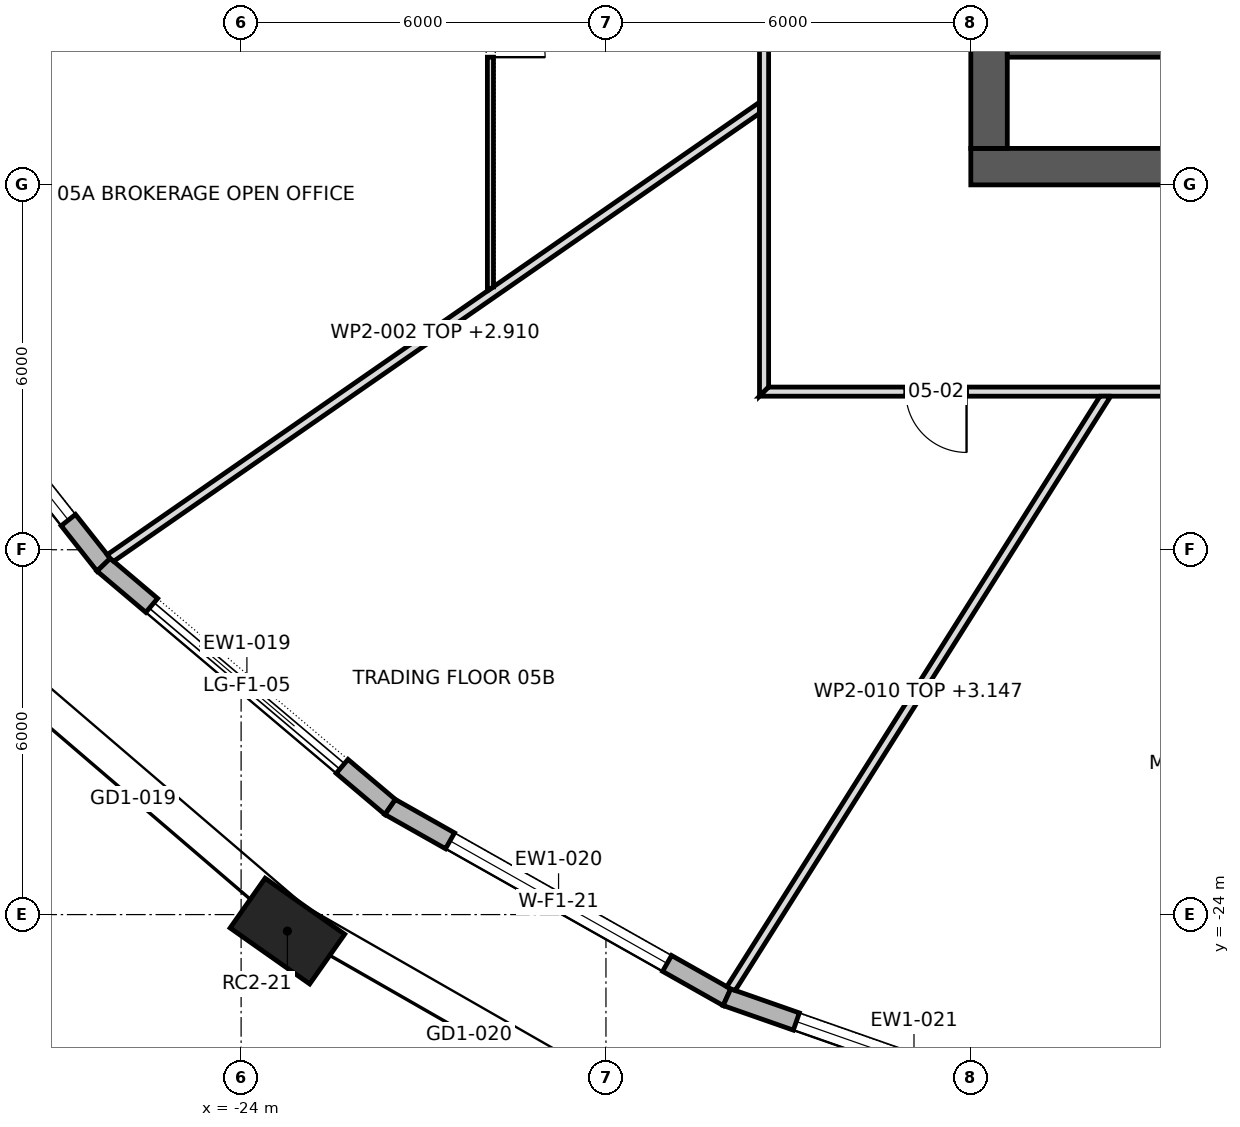
"""IFC4 building model, lengths in metres.
Left out: names, types, materials, properties, quantities, classifications, styles, units other than length and angle.
Written with IfcOpenShell. Run it as: python <this file> out.ifc"""

import sys

from ifc_helpers import new_model, si_unit, direction, frame, frame_2d, origin, origin_2d, place, context, subcontext, project, spatial, polyline, rectangle, outline, extrude, element, fill, save


model = new_model("IFC4")
c1 = context("Model", 3, precision=1e-05, world=origin(), true_north=direction((0.0, 1.0)))
c2 = subcontext(c1, "Body", "Model", "MODEL_VIEW")
j1 = project(units=[si_unit("LENGTHUNIT", "METRE"), si_unit("PLANEANGLEUNIT", "RADIAN")], contexts=[c1])
p1 = place(None, origin())
s1 = spatial("IfcSite", under=j1, at=p1, CompositionType="ELEMENT")
p2 = place(p1, origin())
s2 = spatial("IfcBuilding", under=s1, at=p2, CompositionType="ELEMENT")
p3 = place(p2, frame((0.0, 0.0, 73.9)))
s3 = spatial("IfcBuildingStorey", under=s2, at=p3, CompositionType="ELEMENT", Elevation=73.9)
p4 = place(p3, frame((-23.239, -24.271, 0.0), z_axis=(0.0, 0.0, 1.0), x_axis=(0.817908788019, -0.57534790734, 0.0)))
e1 = element("IfcColumn", 1, at=p4, inside=s3, PredefinedType="COLUMN", context=c2, shape_type="SweptSolid", body=[
    extrude(rectangle(XDim=1.6, YDim=1.0, at=origin_2d()), origin(), (0.0, 0.0, 1.0), 4.2),
])
p5 = place(p3, frame((-12.0, -11.7, 0.0), z_axis=(0.0, 0.0, 1.0), x_axis=(1.0, 0.0, 0.0)))
e2 = element("IfcWall", 2, at=p5, inside=s3, PredefinedType="SHEAR", context=c2, shape_type="SweptSolid", body=[
    extrude(rectangle(XDim=24.0, YDim=0.6, at=frame_2d((12.0, 0.0))), origin(), (0.0, 0.0, 1.0), 4.2),
])
p6 = place(p5, frame((9.975, 0.0, 0.0)))
e3 = element("IfcOpeningElement", 3, at=p6, cuts=e2, PredefinedType="OPENING", context=c2, shape_type="SweptSolid", body=[
    extrude(rectangle(XDim=0.9, YDim=2.1, at=frame_2d((0.45, 1.05))), frame((0.0, 0.312, 0.0), z_axis=(0.0, -1.0, 0.0), x_axis=(1.0, 0.0, 0.0)), (0.0, 0.0, 1.0), 0.624),
])
p7 = place(p5, frame((4.6, 0.0, 0.0)))
e4 = element("IfcOpeningElement", 4, at=p7, cuts=e2, PredefinedType="OPENING", context=c2, shape_type="SweptSolid", body=[
    extrude(rectangle(XDim=0.8, YDim=2.1, at=frame_2d((0.4, 1.05))), frame((0.0, 0.312, 0.0), z_axis=(0.0, -1.0, 0.0), x_axis=(1.0, 0.0, 0.0)), (0.0, 0.0, 1.0), 0.624),
])
p8 = place(p5, frame((7.0, 0.0, 0.0)))
e5 = element("IfcOpeningElement", 5, at=p8, cuts=e2, PredefinedType="OPENING", context=c2, shape_type="SweptSolid", body=[
    extrude(rectangle(XDim=0.8, YDim=2.1, at=frame_2d((0.4, 1.05))), frame((0.0, 0.312, 0.0), z_axis=(0.0, -1.0, 0.0), x_axis=(1.0, 0.0, 0.0)), (0.0, 0.0, 1.0), 0.624),
])
p9 = place(p5, frame((15.85, 0.0, 0.0)))
e6 = element("IfcOpeningElement", 6, at=p9, cuts=e2, PredefinedType="OPENING", context=c2, shape_type="SweptSolid", body=[
    extrude(rectangle(XDim=0.8, YDim=2.1, at=frame_2d((0.4, 1.05))), frame((0.0, 0.312, 0.0), z_axis=(0.0, -1.0, 0.0), x_axis=(1.0, 0.0, 0.0)), (0.0, 0.0, 1.0), 0.624),
])
p10 = place(p3, frame((-11.7, -11.4, 0.0), z_axis=(0.0, 0.0, 1.0), x_axis=(0.0, 1.0, 0.0)))
e7 = element("IfcWall", 7, at=p10, inside=s3, PredefinedType="SHEAR", context=c2, shape_type="SweptSolid", body=[
    extrude(rectangle(XDim=22.8, YDim=0.6, at=frame_2d((11.4, 0.0))), origin(), (0.0, 0.0, 1.0), 4.2),
])
p11 = place(p10, frame((10.2, 0.0, 0.0)))
e8 = element("IfcOpeningElement", 8, at=p11, cuts=e7, PredefinedType="OPENING", context=c2, shape_type="SweptSolid", body=[
    extrude(rectangle(XDim=2.4, YDim=2.1, at=frame_2d((1.2, 1.05))), frame((0.0, 0.312, 0.0), z_axis=(0.0, -1.0, 0.0), x_axis=(1.0, 0.0, 0.0)), (0.0, 0.0, 1.0), 0.624),
])
p12 = place(p10, frame((18.925, 0.0, 0.0)))
e9 = element("IfcOpeningElement", 9, at=p12, cuts=e7, PredefinedType="OPENING", context=c2, shape_type="SweptSolid", body=[
    extrude(rectangle(XDim=1.2, YDim=2.1, at=frame_2d((0.6, 1.05))), frame((0.0, 0.312, 0.0), z_axis=(0.0, -1.0, 0.0), x_axis=(1.0, 0.0, 0.0)), (0.0, 0.0, 1.0), 0.624),
])
p13 = place(p10, frame((2.675, 0.0, 0.0)))
e10 = element("IfcOpeningElement", 10, at=p13, cuts=e7, PredefinedType="OPENING", context=c2, shape_type="SweptSolid", body=[
    extrude(rectangle(XDim=1.2, YDim=2.1, at=frame_2d((0.6, 1.05))), frame((0.0, 0.312, 0.0), z_axis=(0.0, -1.0, 0.0), x_axis=(1.0, 0.0, 0.0)), (0.0, 0.0, 1.0), 0.624),
])
p14 = place(p3, frame((-29.964, -13.562, 0.0), z_axis=(0.0, 0.0, 1.0), x_axis=(0.620093447965, -0.784527957303, 0.0)))
e11 = element("IfcWall", 11, at=p14, inside=s3, PredefinedType="STANDARD", context=c2, shape_type="SweptSolid", body=[
    extrude(outline(polyline([(-0.016, -0.15), (5.988, -0.15), (5.958, 0.15), (0.016, 0.15), (-0.016, -0.15)])), origin(), (0.0, 0.0, 1.0), 3.9),
])
p15 = place(p14, frame((0.937, 0.0, 0.6)))
e12 = element("IfcOpeningElement", 12, at=p15, cuts=e11, PredefinedType="OPENING", context=c2, shape_type="SweptSolid", body=[
    extrude(rectangle(XDim=4.1, YDim=2.85, at=frame_2d((2.05, 1.425))), frame((0.0, 0.162, 0.0), z_axis=(0.0, -1.0, 0.0), x_axis=(1.0, 0.0, 0.0)), (0.0, 0.0, 1.0), 0.324),
])
p16 = place(p3, frame((-26.26, -18.248, 0.0), z_axis=(0.0, 0.0, 1.0), x_axis=(0.763693886759, -0.645578536916, 0.0)))
e13 = element("IfcWall", 13, at=p16, inside=s3, PredefinedType="STANDARD", context=c2, shape_type="SweptSolid", body=[
    extrude(outline(polyline([(-0.015, -0.15), (6.184, -0.15), (6.156, 0.15), (0.015, 0.15), (-0.015, -0.15)])), origin(), (0.0, 0.0, 1.0), 3.9),
])
p17 = place(p16, frame((1.035, 0.0, 0.0)))
e14 = element("IfcOpeningElement", 14, at=p17, cuts=e13, PredefinedType="OPENING", context=c2, shape_type="SweptSolid", body=[
    extrude(rectangle(XDim=4.1, YDim=3.45, at=frame_2d((2.05, 1.725))), frame((0.0, 0.162, 0.0), z_axis=(0.0, -1.0, 0.0), x_axis=(1.0, 0.0, 0.0)), (0.0, 0.0, 1.0), 0.324),
])
p18 = place(p3, frame((-21.549, -22.231, 0.0), z_axis=(0.0, 0.0, 1.0), x_axis=(0.870710061474, -0.491796694629, 0.0)))
e15 = element("IfcWall", 15, at=p18, inside=s3, PredefinedType="STANDARD", context=c2, shape_type="SweptSolid", body=[
    extrude(outline(polyline([(-0.014, -0.15), (6.374, -0.15), (6.347, 0.15), (0.014, 0.15), (-0.014, -0.15)])), origin(), (0.0, 0.0, 1.0), 3.9),
])
p19 = place(p18, frame((1.13, 0.0, 0.6)))
e16 = element("IfcOpeningElement", 16, at=p19, cuts=e15, PredefinedType="OPENING", context=c2, shape_type="SweptSolid", body=[
    extrude(rectangle(XDim=4.1, YDim=2.85, at=frame_2d((2.05, 1.425))), frame((0.0, 0.162, 0.0), z_axis=(0.0, -1.0, 0.0), x_axis=(1.0, 0.0, 0.0)), (0.0, 0.0, 1.0), 0.324),
])
p20 = place(p3, frame((-16.01, -25.359, 0.0), z_axis=(0.0, 0.0, 1.0), x_axis=(0.943815136299, -0.330473884736, 0.0)))
e17 = element("IfcWall", 17, at=p20, inside=s3, PredefinedType="STANDARD", context=c2, shape_type="SweptSolid", body=[
    extrude(outline(polyline([(-0.013, -0.15), (6.531, -0.15), (6.505, 0.15), (0.013, 0.15), (-0.013, -0.15)])), origin(), (0.0, 0.0, 1.0), 3.9),
])
p21 = place(p20, frame((1.209, 0.0, 0.6)))
e18 = element("IfcOpeningElement", 18, at=p21, cuts=e17, PredefinedType="OPENING", context=c2, shape_type="SweptSolid", body=[
    extrude(rectangle(XDim=4.1, YDim=2.85, at=frame_2d((2.05, 1.425))), frame((0.0, 0.162, 0.0), z_axis=(0.0, -1.0, 0.0), x_axis=(1.0, 0.0, 0.0)), (0.0, 0.0, 1.0), 0.324),
])
p22 = place(p3, frame((-11.4, -9.825, 0.0), z_axis=(0.0, 0.0, 1.0), x_axis=(1.0, 0.0, 0.0)))
e19 = element("IfcWall", 19, at=p22, inside=s3, PredefinedType="SHEAR", context=c2, shape_type="SweptSolid", body=[
    extrude(rectangle(XDim=8.0, YDim=0.15, at=frame_2d((4.0, 0.0))), origin(), (0.0, 0.0, 1.0), 3.9),
])
p23 = place(p3, frame((-26.158, -18.142, 0.0), z_axis=(0.0, 0.0, 1.0), x_axis=(0.821670699987, 0.569962508226, 0.0)))
e20 = element("IfcWall", 20, at=p23, inside=s3, PredefinedType="PARTITIONING", context=c2, shape_type="SweptSolid", body=[
    extrude(outline(polyline([(0.024, -0.075), (1.87, -0.075), (3.717, -0.075), (5.563, -0.075), (7.41, -0.075), (9.257, -0.075), (11.103, -0.075), (12.95, -0.075), (13.003, 0.002), (13.003, 0.002), (13.053, 0.074), (13.053, 0.075), (11.279, 0.075), (9.504, 0.075), (7.729, 0.075), (7.728, 0.073), (7.726, 0.075), (5.794, 0.075), (3.863, 0.075), (1.931, 0.075), (0.0, 0.075), (0.0, 0.073), (0.005, -0.004), (0.024, -0.075)])), origin(), (0.0, 0.0, 1.0), 2.91),
])
p24 = place(p3, frame((-19.9, -13.744, 0.0), z_axis=(0.0, 0.0, 1.0), x_axis=(0.0, 1.0, 0.0)))
e21 = element("IfcWall", 21, at=p24, inside=s3, PredefinedType="PARTITIONING", context=c2, shape_type="SweptSolid", body=[
    extrude(outline(polyline([(0.069, -0.05), (1.976, -0.05), (3.882, -0.05), (5.788, -0.05), (7.695, -0.05), (9.601, -0.05), (11.508, -0.05), (13.414, -0.05), (15.321, -0.05), (15.329, 0.049), (15.329, 0.05), (13.644, 0.05), (11.958, 0.05), (10.273, 0.05), (8.588, 0.05), (8.58, 0.048), (8.58, 0.05), (6.864, 0.05), (5.148, 0.05), (3.432, 0.05), (1.716, 0.05), (0.0, 0.05), (0.0, 0.05), (0.069, -0.05)])), origin(), (0.0, 0.0, 1.0), 3.9),
])
p25 = place(p24, frame((3.844, 0.0, 0.0)))
e22 = element("IfcOpeningElement", 22, at=p25, cuts=e21, PredefinedType="OPENING", context=c2, shape_type="SweptSolid", body=[
    extrude(rectangle(XDim=0.9, YDim=2.1, at=frame_2d((0.45, 1.05))), frame((0.0, 0.062, 0.0), z_axis=(0.0, -1.0, 0.0), x_axis=(1.0, 0.0, 0.0)), (0.0, 0.0, 1.0), 0.124),
])
p26 = place(p24, frame((13.294, 0.0, 0.0)))
e23 = element("IfcOpeningElement", 23, at=p26, cuts=e21, PredefinedType="OPENING", context=c2, shape_type="SweptSolid", body=[
    extrude(rectangle(XDim=0.9, YDim=2.1, at=frame_2d((0.45, 1.05))), frame((0.0, 0.062, 0.0), z_axis=(0.0, -1.0, 0.0), x_axis=(1.0, 0.0, 0.0)), (0.0, 0.0, 1.0), 0.124),
])
p27 = place(p3, frame((-15.4, -15.475, 0.0), z_axis=(0.0, 0.0, 1.0), x_axis=(0.0, 1.0, 0.0)))
e24 = element("IfcWall", 24, at=p27, inside=s3, PredefinedType="PARTITIONING", context=c2, shape_type="SweptSolid", body=[
    extrude(outline(polyline([(0.15, -0.075), (2.066, -0.075), (3.981, -0.075), (5.897, -0.075), (7.812, -0.075), (9.728, -0.075), (11.644, -0.075), (13.56, -0.075), (15.475, -0.075), (17.391, -0.075), (19.306, -0.075), (21.222, -0.075), (23.138, -0.075), (25.053, -0.075), (26.969, -0.075), (28.885, -0.075), (30.8, -0.075), (30.95, 0.075), (29.016, 0.075), (27.081, 0.075), (25.147, 0.075), (23.212, 0.075), (21.278, 0.075), (19.344, 0.075), (17.409, 0.075), (15.475, 0.075), (13.541, 0.075), (11.606, 0.075), (9.672, 0.075), (7.738, 0.075), (5.803, 0.075), (3.869, 0.075), (1.935, 0.075), (0.0, 0.075), (0.15, -0.075)])), origin(), (0.0, 0.0, 1.0), 3.9),
])
p28 = place(p27, frame((10.275, 0.0, 0.0)))
e25 = element("IfcOpeningElement", 25, at=p28, cuts=e24, PredefinedType="OPENING", context=c2, shape_type="SweptSolid", body=[
    extrude(rectangle(XDim=1.0, YDim=2.1, at=frame_2d((0.5, 1.05))), frame((0.0, 0.087, 0.0), z_axis=(0.0, -1.0, 0.0), x_axis=(1.0, 0.0, 0.0)), (0.0, 0.0, 1.0), 0.174),
])
p29 = place(p27, frame((22.915, 0.0, 0.0)))
e26 = element("IfcOpeningElement", 26, at=p29, cuts=e24, PredefinedType="OPENING", context=c2, shape_type="SweptSolid", body=[
    extrude(rectangle(XDim=1.8, YDim=2.1, at=frame_2d((0.9, 1.05))), frame((0.0, 0.087, 0.0), z_axis=(0.0, -1.0, 0.0), x_axis=(1.0, 0.0, 0.0)), (0.0, 0.0, 1.0), 0.174),
])
p30 = place(p3, frame((-15.475, -15.4, 0.0), z_axis=(0.0, 0.0, 1.0), x_axis=(1.0, 0.0, 0.0)))
e27 = element("IfcWall", 27, at=p30, inside=s3, PredefinedType="PARTITIONING", context=c2, shape_type="SweptSolid", body=[
    extrude(outline(polyline([(0.0, -0.075), (1.935, -0.075), (3.869, -0.075), (5.803, -0.075), (7.738, -0.075), (9.672, -0.075), (11.606, -0.075), (13.541, -0.075), (15.475, -0.075), (17.409, -0.075), (19.344, -0.075), (21.278, -0.075), (23.212, -0.075), (25.147, -0.075), (27.081, -0.075), (29.016, -0.075), (30.95, -0.075), (30.8, 0.075), (28.885, 0.075), (26.969, 0.075), (25.053, 0.075), (23.138, 0.075), (21.222, 0.075), (19.306, 0.075), (17.391, 0.075), (15.475, 0.075), (13.56, 0.075), (11.644, 0.075), (9.728, 0.075), (7.812, 0.075), (5.897, 0.075), (3.981, 0.075), (2.066, 0.075), (0.15, 0.075), (0.0, -0.075)])), origin(), (0.0, 0.0, 1.0), 3.9),
])
p31 = place(p30, frame((2.405, 0.0, 0.0)))
e28 = element("IfcOpeningElement", 28, at=p31, cuts=e27, PredefinedType="OPENING", context=c2, shape_type="SweptSolid", body=[
    extrude(rectangle(XDim=1.0, YDim=2.1, at=frame_2d((0.5, 1.05))), frame((0.0, 0.087, 0.0), z_axis=(0.0, -1.0, 0.0), x_axis=(1.0, 0.0, 0.0)), (0.0, 0.0, 1.0), 0.174),
])
p32 = place(p30, frame((12.47, 0.0, 0.0)))
e29 = element("IfcOpeningElement", 29, at=p32, cuts=e27, PredefinedType="OPENING", context=c2, shape_type="SweptSolid", body=[
    extrude(rectangle(XDim=1.8, YDim=2.1, at=frame_2d((0.9, 1.05))), frame((0.0, 0.087, 0.0), z_axis=(0.0, -1.0, 0.0), x_axis=(1.0, 0.0, 0.0)), (0.0, 0.0, 1.0), 0.174),
])
p33 = place(p30, frame((25.04, 0.0, 0.0)))
e30 = element("IfcOpeningElement", 30, at=p33, cuts=e27, PredefinedType="OPENING", context=c2, shape_type="SweptSolid", body=[
    extrude(rectangle(XDim=1.8, YDim=2.1, at=frame_2d((0.9, 1.05))), frame((0.0, 0.087, 0.0), z_axis=(0.0, -1.0, 0.0), x_axis=(1.0, 0.0, 0.0)), (0.0, 0.0, 1.0), 0.174),
])
p34 = place(p3, frame((-9.762, -15.435, 0.0), z_axis=(0.0, 0.0, 1.0), x_axis=(-0.534199196173, -0.845358633249, 0.0)))
e31 = element("IfcWall", 31, at=p34, inside=s3, PredefinedType="PARTITIONING", context=c2, shape_type="SweptSolid", body=[
    extrude(outline(polyline([(11.581, -0.075), (11.581, -0.066), (11.578, -0.001), (11.56, 0.075), (9.633, 0.075), (7.707, 0.075), (5.78, 0.075), (3.853, 0.075), (1.927, 0.075), (0.0, 0.075), (0.0, 0.075), (0.095, -0.075), (2.009, -0.075), (3.923, -0.075), (5.838, -0.075), (7.752, -0.075), (9.667, -0.075), (11.581, -0.075)])), origin(), (0.0, 0.0, 1.0), 3.147),
])
p35 = place(p15, origin())
e32 = element("IfcWindow", 32, at=p35, inside=s3, PartitioningType="TRIPLE_PANEL_VERTICAL", PredefinedType="WINDOW", context=c2, shape_type="SweptSolid", body=[
    extrude(rectangle(XDim=4.1, YDim=2.85, at=frame_2d((2.05, 1.425))), frame((0.0, 0.03, 0.0), z_axis=(0.0, -1.0, 0.0), x_axis=(1.0, 0.0, 0.0)), (0.0, 0.0, 1.0), 0.06),
])
fill(e12, e32)
p36 = place(p17, origin())
e33 = element("IfcDoor", 33, at=p36, inside=s3, OperationType="DOUBLE_DOOR_SLIDING", PredefinedType="DOOR", context=c2, shape_type="SweptSolid", body=[
    extrude(rectangle(XDim=4.1, YDim=3.45, at=frame_2d((2.05, 1.725))), frame((0.0, 0.025, 0.0), z_axis=(0.0, -1.0, 0.0), x_axis=(1.0, 0.0, 0.0)), (0.0, 0.0, 1.0), 0.05),
])
fill(e14, e33)
p37 = place(p19, origin())
e34 = element("IfcWindow", 34, at=p37, inside=s3, PartitioningType="TRIPLE_PANEL_VERTICAL", PredefinedType="WINDOW", context=c2, shape_type="SweptSolid", body=[
    extrude(rectangle(XDim=4.1, YDim=2.85, at=frame_2d((2.05, 1.425))), frame((0.0, 0.03, 0.0), z_axis=(0.0, -1.0, 0.0), x_axis=(1.0, 0.0, 0.0)), (0.0, 0.0, 1.0), 0.06),
])
fill(e16, e34)
p38 = place(p21, origin())
e35 = element("IfcWindow", 35, at=p38, inside=s3, PartitioningType="TRIPLE_PANEL_VERTICAL", PredefinedType="WINDOW", context=c2, shape_type="SweptSolid", body=[
    extrude(rectangle(XDim=4.1, YDim=2.85, at=frame_2d((2.05, 1.425))), frame((0.0, 0.03, 0.0), z_axis=(0.0, -1.0, 0.0), x_axis=(1.0, 0.0, 0.0)), (0.0, 0.0, 1.0), 0.06),
])
fill(e18, e35)
p39 = place(p31, frame((1.0, 0.0, 0.0), z_axis=(0.0, 0.0, 1.0), x_axis=(-1.0, 0.0, 0.0)))
e36 = element("IfcDoor", 36, at=p39, inside=s3, OperationType="SINGLE_SWING_RIGHT", PredefinedType="DOOR", context=c2, shape_type="SweptSolid", body=[
    extrude(rectangle(XDim=1.0, YDim=2.1, at=frame_2d((0.5, 1.05))), frame((0.0, 0.025, 0.0), z_axis=(0.0, -1.0, 0.0), x_axis=(1.0, 0.0, 0.0)), (0.0, 0.0, 1.0), 0.05),
])
fill(e28, e36)
p40 = place(p25, frame((0.9, 0.0, 0.0), z_axis=(0.0, 0.0, 1.0), x_axis=(-1.0, 0.0, 0.0)))
e37 = element("IfcDoor", 37, at=p40, inside=s3, OperationType="SINGLE_SWING_LEFT", PredefinedType="DOOR", context=c2, shape_type="SweptSolid", body=[
    extrude(rectangle(XDim=0.9, YDim=2.1, at=frame_2d((0.45, 1.05))), frame((0.0, 0.025, 0.0), z_axis=(0.0, -1.0, 0.0), x_axis=(1.0, 0.0, 0.0)), (0.0, 0.0, 1.0), 0.05),
])
fill(e22, e37)
save(model, sys.argv[1])
